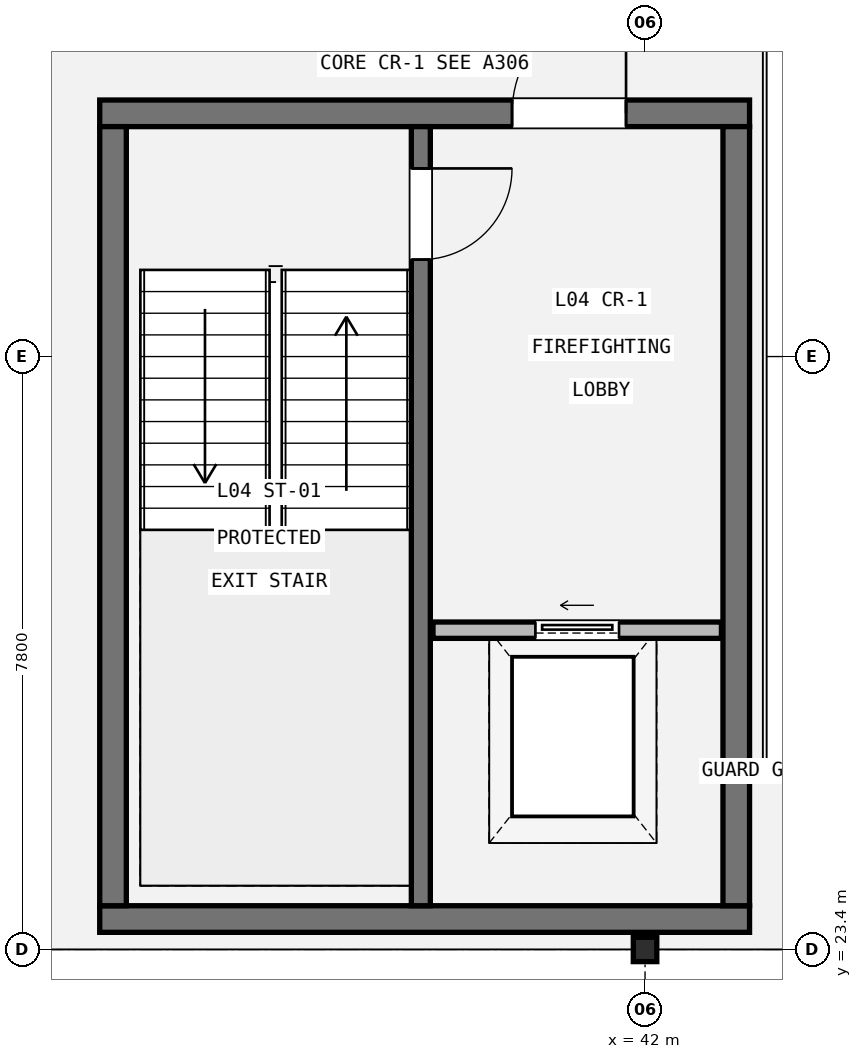
"""IFC4 building model, lengths in metres.
Left out: names, types, materials, properties, quantities, classifications, styles, units other than length and angle.
Written with IfcOpenShell. Run it as: python <this file> out.ifc"""

import sys

from ifc_helpers import new_model, si_unit, direction, frame, frame_2d, origin, origin_2d, place, context, subcontext, project, spatial, rectangle, i_section, extrude, element, fill, save


model = new_model("IFC4")
c1 = context("Model", 3, precision=1e-05, world=origin(), true_north=direction((0.0, 1.0)))
c2 = subcontext(c1, "Body", "Model", "MODEL_VIEW")
j1 = project(units=[si_unit("LENGTHUNIT", "METRE"), si_unit("PLANEANGLEUNIT", "RADIAN")], contexts=[c1])
p1 = place(None, origin())
s1 = spatial("IfcSite", under=j1, at=p1, CompositionType="ELEMENT")
p2 = place(p1, origin())
s2 = spatial("IfcBuilding", under=s1, at=p2, CompositionType="ELEMENT")
p3 = place(p2, frame((0.0, 0.0, 19.2)))
s3 = spatial("IfcBuildingStorey", under=s2, at=p3, CompositionType="ELEMENT", Elevation=19.2)
p4 = place(p3, frame((42.0, 23.4, 0.0), z_axis=(0.0, 0.0, 1.0), x_axis=(1.0, 0.0, 0.0)))
e1 = element("IfcColumn", 1, at=p4, inside=s3, PredefinedType="COLUMN", context=c2, shape_type="SweptSolid", body=[
    extrude(i_section(OverallWidth=0.309, OverallDepth=0.321, WebThickness=0.014, FlangeThickness=0.022, FilletRadius=0.015, at=origin_2d()), origin(), (0.0, 0.0, 1.0), 4.2),
])
p5 = place(p3, frame((43.375, 23.8, 0.0), z_axis=(0.0, 0.0, 1.0), x_axis=(-1.0, 0.0, 0.0)))
e2 = element("IfcWall", 2, at=p5, inside=s3, PredefinedType="SHEAR", context=c2, shape_type="SweptSolid", body=[
    extrude(rectangle(XDim=8.55, YDim=0.35, at=frame_2d((4.275, 0.0))), origin(), (0.0, 0.0, 1.0), 4.0),
])
p6 = place(p3, frame((34.825, 34.4, 0.0), z_axis=(0.0, 0.0, 1.0), x_axis=(1.0, 0.0, 0.0)))
e3 = element("IfcWall", 3, at=p6, inside=s3, PredefinedType="SHEAR", context=c2, shape_type="SweptSolid", body=[
    extrude(rectangle(XDim=8.55, YDim=0.35, at=frame_2d((4.275, 0.0))), origin(), (0.0, 0.0, 1.0), 4.0),
])
p7 = place(p6, frame((5.425, 0.0, 0.0)))
e4 = element("IfcOpeningElement", 4, at=p7, cuts=e3, PredefinedType="OPENING", context=c2, shape_type="SweptSolid", body=[
    extrude(rectangle(XDim=1.5, YDim=2.15, at=frame_2d((0.75, 1.075))), frame((0.0, 0.185, 0.0), z_axis=(0.0, -1.0, 0.0), x_axis=(1.0, 0.0, 0.0)), (0.0, 0.0, 1.0), 0.37),
])
for number, where, z_axis, x_axis in (
    (5, (35.0, 23.975, 0.0), (0.0, 0.0, 1.0), (0.0, 1.0, 0.0)),
    (6, (43.2, 34.225, 0.0), (0.0, 0.0, 1.0), (0.0, -1.0, 0.0)),
):
    element("IfcWall", number, at=place(p3, frame(where, z_axis=z_axis, x_axis=x_axis)), inside=s3, PredefinedType="SHEAR", context=c2, shape_type="SweptSolid", body=[
        extrude(rectangle(XDim=10.25, YDim=0.35, at=frame_2d((5.125, 0.0))), origin(), (0.0, 0.0, 1.0), 4.0),
    ])
p8 = place(p3, frame((39.05, 34.225, 0.0), z_axis=(0.0, 0.0, 1.0), x_axis=(0.0, -1.0, 0.0)))
e7 = element("IfcWall", 7, at=p8, inside=s3, PredefinedType="SHEAR", context=c2, shape_type="SweptSolid", body=[
    extrude(rectangle(XDim=10.25, YDim=0.25, at=frame_2d((5.125, 0.0))), origin(), (0.0, 0.0, 1.0), 4.0),
])
p9 = place(p8, frame((0.55, 0.0, 0.0)))
e8 = element("IfcOpeningElement", 8, at=p9, cuts=e7, PredefinedType="OPENING", context=c2, shape_type="SweptSolid", body=[
    extrude(rectangle(XDim=1.2, YDim=2.15, at=frame_2d((0.6, 1.075))), frame((0.0, 0.135, 0.0), z_axis=(0.0, -1.0, 0.0), x_axis=(1.0, 0.0, 0.0)), (0.0, 0.0, 1.0), 0.27),
])
p10 = place(p3, frame((39.21, 27.6, 0.0), z_axis=(0.0, 0.0, 1.0), x_axis=(1.0, 0.0, 0.0)))
e9 = element("IfcWall", 9, at=p10, inside=s3, PredefinedType="STANDARD", context=c2, shape_type="SweptSolid", body=[
    extrude(rectangle(XDim=3.795, YDim=0.215, at=frame_2d((1.897, 0.0))), origin(), (0.0, 0.0, 1.0), 3.992),
])
p11 = place(p10, frame((1.347, 0.0, 0.0)))
e10 = element("IfcOpeningElement", 10, at=p11, cuts=e9, PredefinedType="OPENING", context=c2, shape_type="SweptSolid", body=[
    extrude(rectangle(XDim=1.1, YDim=2.2, at=frame_2d((0.55, 1.1))), frame((0.0, 0.117, 0.0), z_axis=(0.0, -1.0, 0.0), x_axis=(1.0, 0.0, 0.0)), (0.0, 0.0, 1.0), 0.235),
])
p12 = place(p9, origin())
e11 = element("IfcDoor", 11, at=p12, inside=s3, OperationType="SINGLE_SWING_LEFT", PredefinedType="DOOR", context=c2, shape_type="SweptSolid", body=[
    extrude(rectangle(XDim=1.2, YDim=2.15, at=frame_2d((0.6, 1.075))), frame((0.0, 0.025, 0.0), z_axis=(0.0, -1.0, 0.0), x_axis=(1.0, 0.0, 0.0)), (0.0, 0.0, 1.0), 0.05),
])
fill(e8, e11)
p13 = place(p7, origin())
e12 = element("IfcDoor", 12, at=p13, inside=s3, OperationType="SINGLE_SWING_RIGHT", PredefinedType="DOOR", context=c2, shape_type="SweptSolid", body=[
    extrude(rectangle(XDim=1.5, YDim=2.15, at=frame_2d((0.75, 1.075))), frame((0.0, 0.025, 0.0), z_axis=(0.0, -1.0, 0.0), x_axis=(1.0, 0.0, 0.0)), (0.0, 0.0, 1.0), 0.05),
])
fill(e4, e12)
p14 = place(p11, origin())
e13 = element("IfcDoor", 13, at=p14, inside=s3, OperationType="SLIDING_TO_LEFT", PredefinedType="DOOR", context=c2, shape_type="SweptSolid", body=[
    extrude(rectangle(XDim=1.1, YDim=2.2, at=frame_2d((0.55, 1.1))), frame((0.0, 0.025, 0.0), z_axis=(0.0, -1.0, 0.0), x_axis=(1.0, 0.0, 0.0)), (0.0, 0.0, 1.0), 0.05),
])
fill(e10, e13)
save(model, sys.argv[1])
